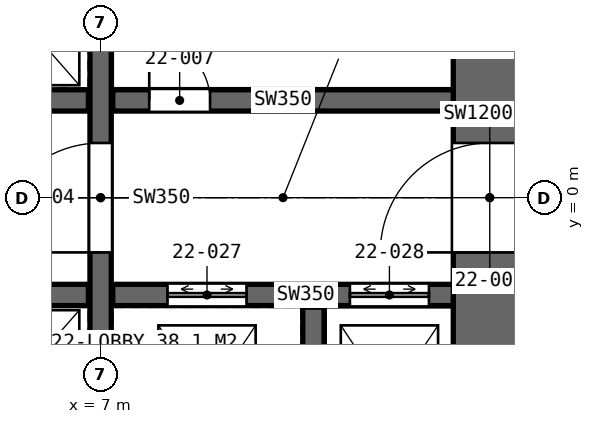
"""IFC4 building model, lengths in metres.
Left out: names, types, materials, properties, quantities, classifications, styles, units other than length and angle.
Written with IfcOpenShell. Run it as: python <this file> out.ifc"""

import sys

from ifc_helpers import new_model, si_unit, direction, frame, frame_2d, origin, place, context, subcontext, project, spatial, rectangle, extrude, element, fill, save


model = new_model("IFC4")
c1 = context("Model", 3, precision=1e-05, world=origin(), true_north=direction((0.0, 1.0)))
c2 = subcontext(c1, "Body", "Model", "MODEL_VIEW")
j1 = project(units=[si_unit("LENGTHUNIT", "METRE"), si_unit("PLANEANGLEUNIT", "RADIAN")], contexts=[c1])
p1 = place(None, origin())
s1 = spatial("IfcSite", under=j1, at=p1, CompositionType="ELEMENT")
p2 = place(p1, origin())
s2 = spatial("IfcBuilding", under=s1, at=p2, CompositionType="ELEMENT")
p3 = place(p2, frame((0.0, 0.0, 109.2)))
s3 = spatial("IfcBuildingStorey", under=s2, at=p3, CompositionType="ELEMENT", Elevation=109.2)
p4 = place(p3, frame((13.4, -8.8, 0.0), z_axis=(0.0, 0.0, 1.0), x_axis=(0.0, 1.0, 0.0)))
e1 = element("IfcWall", 1, at=p4, inside=s3, PredefinedType="SHEAR", context=c2, shape_type="SweptSolid", body=[
    extrude(rectangle(XDim=17.6, YDim=1.2, at=frame_2d((8.8, 0.0))), origin(), (0.0, 0.0, 1.0), 4.2),
])
p5 = place(p4, frame((7.9, 0.0, 0.0)))
e2 = element("IfcOpeningElement", 2, at=p5, cuts=e1, PredefinedType="OPENING", context=c2, shape_type="SweptSolid", body=[
    extrude(rectangle(XDim=1.8, YDim=2.4, at=frame_2d((0.9, 1.2))), frame((0.0, 0.61, 0.0), z_axis=(0.0, -1.0, 0.0), x_axis=(1.0, 0.0, 0.0)), (0.0, 0.0, 1.0), 1.22),
])
p6 = place(p3, frame((7.0, -8.8, 0.0), z_axis=(0.0, 0.0, 1.0), x_axis=(0.0, 1.0, 0.0)))
e3 = element("IfcWall", 3, at=p6, inside=s3, PredefinedType="SHEAR", context=c2, shape_type="SweptSolid", body=[
    extrude(rectangle(XDim=17.6, YDim=0.35, at=frame_2d((8.8, 0.0))), origin(), (0.0, 0.0, 1.0), 4.2),
])
p7 = place(p6, frame((7.9, 0.0, 0.0)))
e4 = element("IfcOpeningElement", 4, at=p7, cuts=e3, PredefinedType="OPENING", context=c2, shape_type="SweptSolid", body=[
    extrude(rectangle(XDim=1.8, YDim=2.4, at=frame_2d((0.9, 1.2))), frame((0.0, 0.185, 0.0), z_axis=(0.0, -1.0, 0.0), x_axis=(1.0, 0.0, 0.0)), (0.0, 0.0, 1.0), 0.37),
])
p8 = place(p3, frame((-6.8, 1.6, 0.0), z_axis=(0.0, 0.0, 1.0), x_axis=(1.0, 0.0, 0.0)))
e5 = element("IfcWall", 5, at=p8, inside=s3, PredefinedType="SHEAR", context=c2, shape_type="SweptSolid", body=[
    extrude(rectangle(XDim=13.6, YDim=0.35, at=frame_2d((6.8, 0.0))), origin(), (0.0, 0.0, 1.0), 4.2),
])
p9 = place(p8, frame((0.365, 0.0, 0.0)))
e6 = element("IfcOpeningElement", 6, at=p9, cuts=e5, PredefinedType="OPENING", context=c2, shape_type="SweptSolid", body=[
    extrude(rectangle(XDim=1.0, YDim=2.4, at=frame_2d((0.5, 1.2))), frame((0.0, 0.185, 0.0), z_axis=(0.0, -1.0, 0.0), x_axis=(1.0, 0.0, 0.0)), (0.0, 0.0, 1.0), 0.37),
])
p10 = place(p8, frame((3.2, 0.0, 0.0)))
e7 = element("IfcOpeningElement", 7, at=p10, cuts=e5, PredefinedType="OPENING", context=c2, shape_type="SweptSolid", body=[
    extrude(rectangle(XDim=1.0, YDim=2.4, at=frame_2d((0.5, 1.2))), frame((0.0, 0.185, 0.0), z_axis=(0.0, -1.0, 0.0), x_axis=(1.0, 0.0, 0.0)), (0.0, 0.0, 1.0), 0.37),
])
p11 = place(p8, frame((6.95, 0.0, 0.0)))
e8 = element("IfcOpeningElement", 8, at=p11, cuts=e5, PredefinedType="OPENING", context=c2, shape_type="SweptSolid", body=[
    extrude(rectangle(XDim=0.9, YDim=2.4, at=frame_2d((0.45, 1.2))), frame((0.0, 0.185, 0.0), z_axis=(0.0, -1.0, 0.0), x_axis=(1.0, 0.0, 0.0)), (0.0, 0.0, 1.0), 0.37),
])
p12 = place(p8, frame((9.535, 0.0, 0.0)))
e9 = element("IfcOpeningElement", 9, at=p12, cuts=e5, PredefinedType="OPENING", context=c2, shape_type="SweptSolid", body=[
    extrude(rectangle(XDim=1.0, YDim=2.4, at=frame_2d((0.5, 1.2))), frame((0.0, 0.185, 0.0), z_axis=(0.0, -1.0, 0.0), x_axis=(1.0, 0.0, 0.0)), (0.0, 0.0, 1.0), 0.37),
])
p13 = place(p3, frame((-6.8, -1.6, 0.0), z_axis=(0.0, 0.0, 1.0), x_axis=(1.0, 0.0, 0.0)))
e10 = element("IfcWall", 10, at=p13, inside=s3, PredefinedType="SHEAR", context=c2, shape_type="SweptSolid", body=[
    extrude(rectangle(XDim=13.6, YDim=0.35, at=frame_2d((6.8, 0.0))), origin(), (0.0, 0.0, 1.0), 4.2),
])
p14 = place(p13, frame((0.7, 0.0, 0.0)))
e11 = element("IfcOpeningElement", 11, at=p14, cuts=e10, PredefinedType="OPENING", context=c2, shape_type="SweptSolid", body=[
    extrude(rectangle(XDim=1.1, YDim=2.4, at=frame_2d((0.55, 1.2))), frame((0.0, 0.185, 0.0), z_axis=(0.0, -1.0, 0.0), x_axis=(1.0, 0.0, 0.0)), (0.0, 0.0, 1.0), 0.37),
])
p15 = place(p13, frame((3.5, 0.0, 0.0)))
e12 = element("IfcOpeningElement", 12, at=p15, cuts=e10, PredefinedType="OPENING", context=c2, shape_type="SweptSolid", body=[
    extrude(rectangle(XDim=1.1, YDim=2.4, at=frame_2d((0.55, 1.2))), frame((0.0, 0.185, 0.0), z_axis=(0.0, -1.0, 0.0), x_axis=(1.0, 0.0, 0.0)), (0.0, 0.0, 1.0), 0.37),
])
p16 = place(p13, frame((6.3, 0.0, 0.0)))
e13 = element("IfcOpeningElement", 13, at=p16, cuts=e10, PredefinedType="OPENING", context=c2, shape_type="SweptSolid", body=[
    extrude(rectangle(XDim=1.1, YDim=2.4, at=frame_2d((0.55, 1.2))), frame((0.0, 0.185, 0.0), z_axis=(0.0, -1.0, 0.0), x_axis=(1.0, 0.0, 0.0)), (0.0, 0.0, 1.0), 0.37),
])
p17 = place(p13, frame((9.1, 0.0, 0.0)))
e14 = element("IfcOpeningElement", 14, at=p17, cuts=e10, PredefinedType="OPENING", context=c2, shape_type="SweptSolid", body=[
    extrude(rectangle(XDim=1.1, YDim=2.4, at=frame_2d((0.55, 1.2))), frame((0.0, 0.185, 0.0), z_axis=(0.0, -1.0, 0.0), x_axis=(1.0, 0.0, 0.0)), (0.0, 0.0, 1.0), 0.37),
])
p18 = place(p3, frame((7.2, 1.6, 0.0), z_axis=(0.0, 0.0, 1.0), x_axis=(1.0, 0.0, 0.0)))
e15 = element("IfcWall", 15, at=p18, inside=s3, PredefinedType="SHEAR", context=c2, shape_type="SweptSolid", body=[
    extrude(rectangle(XDim=5.6, YDim=0.35, at=frame_2d((2.8, 0.0))), origin(), (0.0, 0.0, 1.0), 4.2),
])
p19 = place(p18, frame((0.6, 0.0, 0.0)))
e16 = element("IfcOpeningElement", 16, at=p19, cuts=e15, PredefinedType="OPENING", context=c2, shape_type="SweptSolid", body=[
    extrude(rectangle(XDim=1.0, YDim=2.4, at=frame_2d((0.5, 1.2))), frame((0.0, 0.185, 0.0), z_axis=(0.0, -1.0, 0.0), x_axis=(1.0, 0.0, 0.0)), (0.0, 0.0, 1.0), 0.37),
])
p20 = place(p3, frame((7.2, -1.6, 0.0), z_axis=(0.0, 0.0, 1.0), x_axis=(1.0, 0.0, 0.0)))
e17 = element("IfcWall", 17, at=p20, inside=s3, PredefinedType="SHEAR", context=c2, shape_type="SweptSolid", body=[
    extrude(rectangle(XDim=5.6, YDim=0.35, at=frame_2d((2.8, 0.0))), origin(), (0.0, 0.0, 1.0), 4.2),
])
p21 = place(p20, frame((0.9, 0.0, 0.0)))
e18 = element("IfcOpeningElement", 18, at=p21, cuts=e17, PredefinedType="OPENING", context=c2, shape_type="SweptSolid", body=[
    extrude(rectangle(XDim=1.3, YDim=2.4, at=frame_2d((0.65, 1.2))), frame((0.0, 0.185, 0.0), z_axis=(0.0, -1.0, 0.0), x_axis=(1.0, 0.0, 0.0)), (0.0, 0.0, 1.0), 0.37),
])
p22 = place(p20, frame((3.9, 0.0, 0.0)))
e19 = element("IfcOpeningElement", 19, at=p22, cuts=e17, PredefinedType="OPENING", context=c2, shape_type="SweptSolid", body=[
    extrude(rectangle(XDim=1.3, YDim=2.4, at=frame_2d((0.65, 1.2))), frame((0.0, 0.185, 0.0), z_axis=(0.0, -1.0, 0.0), x_axis=(1.0, 0.0, 0.0)), (0.0, 0.0, 1.0), 0.37),
])
p23 = place(p3, frame((10.5, -4.8, 0.0), z_axis=(0.0, 0.0, 1.0), x_axis=(0.0, 1.0, 0.0)))
e20 = element("IfcWall", 20, at=p23, inside=s3, PredefinedType="SHEAR", context=c2, shape_type="SweptSolid", body=[
    extrude(rectangle(XDim=3.0, YDim=0.35, at=frame_2d((1.5, 0.0))), origin(), (0.0, 0.0, 1.0), 4.2),
])
p24 = place(p5, origin())
e21 = element("IfcDoor", 21, at=p24, inside=s3, OperationType="DOUBLE_DOOR_SINGLE_SWING", PredefinedType="DOOR", context=c2, shape_type="SweptSolid", body=[
    extrude(rectangle(XDim=1.8, YDim=2.4, at=frame_2d((0.9, 1.2))), frame((0.0, 0.025, 0.0), z_axis=(0.0, -1.0, 0.0), x_axis=(1.0, 0.0, 0.0)), (0.0, 0.0, 1.0), 0.05),
])
fill(e2, e21)
p25 = place(p7, origin())
e22 = element("IfcDoor", 22, at=p25, inside=s3, OperationType="DOUBLE_DOOR_SINGLE_SWING", PredefinedType="DOOR", context=c2, shape_type="SweptSolid", body=[
    extrude(rectangle(XDim=1.8, YDim=2.4, at=frame_2d((0.9, 1.2))), frame((0.0, 0.025, 0.0), z_axis=(0.0, -1.0, 0.0), x_axis=(1.0, 0.0, 0.0)), (0.0, 0.0, 1.0), 0.05),
])
fill(e4, e22)
p26 = place(p19, origin())
e23 = element("IfcDoor", 23, at=p26, inside=s3, OperationType="SINGLE_SWING_LEFT", PredefinedType="DOOR", context=c2, shape_type="SweptSolid", body=[
    extrude(rectangle(XDim=1.0, YDim=2.4, at=frame_2d((0.5, 1.2))), frame((0.0, 0.025, 0.0), z_axis=(0.0, -1.0, 0.0), x_axis=(1.0, 0.0, 0.0)), (0.0, 0.0, 1.0), 0.05),
])
fill(e16, e23)
p27 = place(p21, origin())
e24 = element("IfcDoor", 24, at=p27, inside=s3, OperationType="DOUBLE_DOOR_SLIDING", PredefinedType="DOOR", context=c2, shape_type="SweptSolid", body=[
    extrude(rectangle(XDim=1.3, YDim=2.4, at=frame_2d((0.65, 1.2))), frame((0.0, 0.025, 0.0), z_axis=(0.0, -1.0, 0.0), x_axis=(1.0, 0.0, 0.0)), (0.0, 0.0, 1.0), 0.05),
])
fill(e18, e24)
p28 = place(p22, origin())
e25 = element("IfcDoor", 25, at=p28, inside=s3, OperationType="DOUBLE_DOOR_SLIDING", PredefinedType="DOOR", context=c2, shape_type="SweptSolid", body=[
    extrude(rectangle(XDim=1.3, YDim=2.4, at=frame_2d((0.65, 1.2))), frame((0.0, 0.025, 0.0), z_axis=(0.0, -1.0, 0.0), x_axis=(1.0, 0.0, 0.0)), (0.0, 0.0, 1.0), 0.05),
])
fill(e19, e25)
save(model, sys.argv[1])
